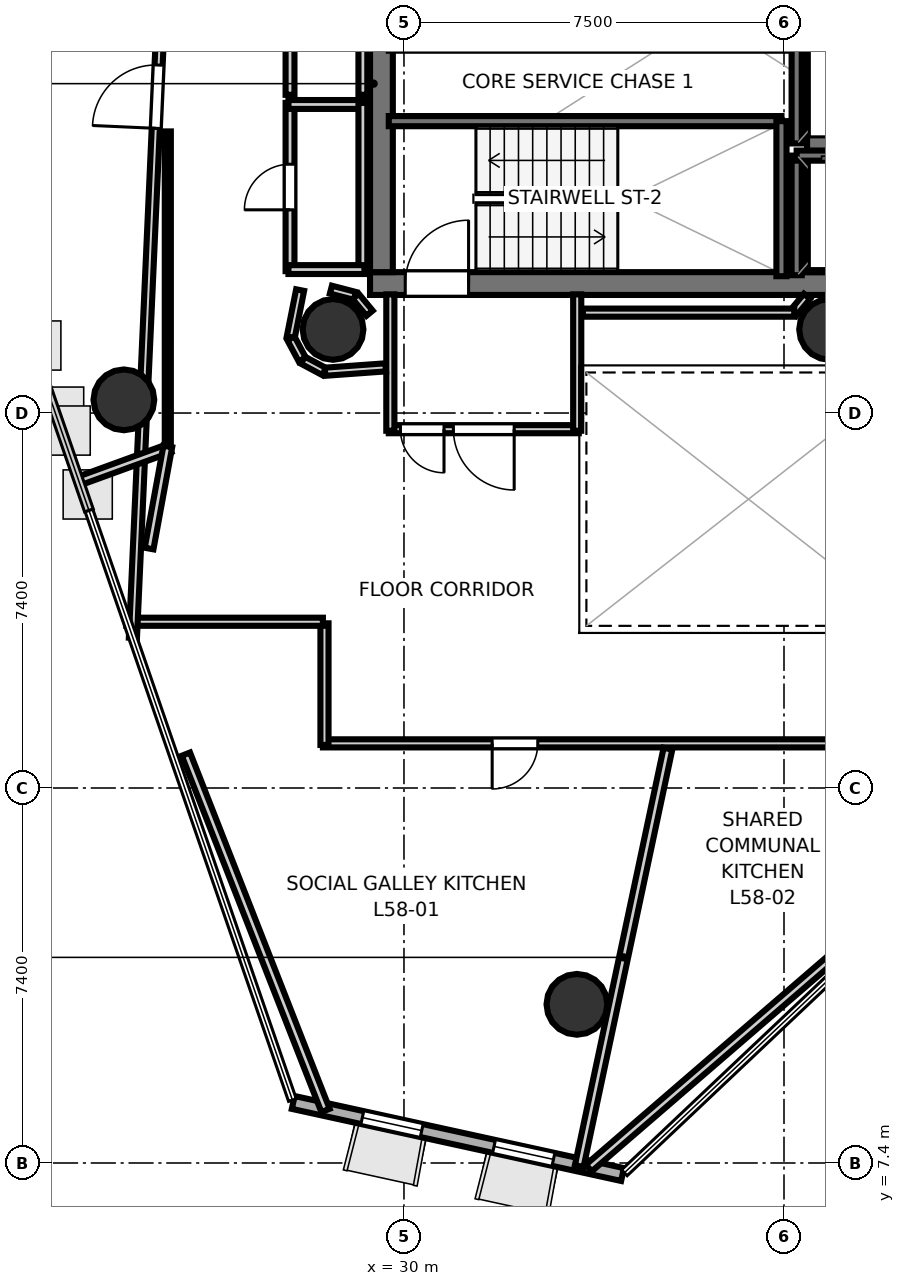
"""IFC4 building model, lengths in metres.
Left out: names, types, materials, properties, quantities, classifications, styles, units other than length and angle.
Written with IfcOpenShell. Run it as: python <this file> out.ifc"""

import sys

from ifc_helpers import new_model, si_unit, direction, frame, frame_2d, origin, origin_2d, place, context, subcontext, project, spatial, rectangle, hollow_circle, extrude, element, fill, save


model = new_model("IFC4")
c1 = context("Model", 3, precision=1e-05, world=origin(), true_north=direction((0.0, 1.0)))
c2 = subcontext(c1, "Body", "Model", "MODEL_VIEW")
j1 = project(units=[si_unit("LENGTHUNIT", "METRE"), si_unit("PLANEANGLEUNIT", "RADIAN")], contexts=[c1])
p1 = place(None, origin())
s1 = spatial("IfcSite", under=j1, at=p1, CompositionType="ELEMENT")
p2 = place(p1, origin())
s2 = spatial("IfcBuilding", under=s1, at=p2, CompositionType="ELEMENT")
p3 = place(p2, frame((0.0, 0.0, 226.2)))
s3 = spatial("IfcBuildingStorey", under=s2, at=p3, CompositionType="ELEMENT", Elevation=226.2)
p4 = place(p3, frame((29.33, 24.755, 0.0), z_axis=(0.0, 0.0, 1.0), x_axis=(1.0, 0.0, 0.0)))
e1 = element("IfcWall", 1, at=p4, inside=s3, PredefinedType="SHEAR", context=c2, shape_type="SweptSolid", body=[
    extrude(rectangle(XDim=10.52, YDim=0.45, at=frame_2d((5.26, 0.0))), origin(), (0.0, 0.0, 1.0), 3.4),
])
p5 = place(p4, frame((0.695, 0.0, 0.0)))
e2 = element("IfcOpeningElement", 2, at=p5, cuts=e1, PredefinedType="OPENING", context=c2, shape_type="SweptSolid", body=[
    extrude(rectangle(XDim=1.25, YDim=2.15, at=frame_2d((0.625, 1.075))), frame((0.0, 0.235, 0.0), z_axis=(0.0, -1.0, 0.0), x_axis=(1.0, 0.0, 0.0)), (0.0, 0.0, 1.0), 0.47),
])
for number, where, z_axis, x_axis in (
    (3, (29.555, 24.98, 0.0), (0.0, 0.0, 1.0), (0.0, 1.0, 0.0)),
    (4, (38.18, 24.98, 0.0), (0.0, 0.0, 1.0), (0.0, 1.0, 0.0)),
):
    element("IfcWall", number, at=place(p3, frame(where, z_axis=z_axis, x_axis=x_axis)), inside=s3, PredefinedType="SHEAR", context=c2, shape_type="SweptSolid", body=[
        extrude(rectangle(XDim=7.44, YDim=0.45, at=frame_2d((3.72, 0.0))), origin(), (0.0, 0.0, 1.0), 3.4),
    ])
for number, where, z_axis, x_axis in (
    (5, (28.6, 23.85, 0.0), (0.0, 0.0, 1.0), (1.0, 0.0, 0.0)),
    (6, (38.4, 23.85, 0.0), (0.0, 0.0, 1.0), (1.0, 0.0, 0.0)),
    (7, (24.472, 22.46, 0.0), (0.0, 0.0, 1.0), (1.0, 0.0, 0.0)),
    (8, (33.413, 10.531, 0.0), (0.0, 0.0, 1.0), (1.0, 0.0, 0.0)),
):
    element("IfcColumn", number, at=place(p3, frame(where, z_axis=z_axis, x_axis=x_axis)), inside=s3, PredefinedType="COLUMN", context=c2, shape_type="SweptSolid", body=[
        extrude(hollow_circle(Radius=0.6, WallThickness=0.03, at=origin_2d()), origin(), (0.0, 0.0, 1.0), 3.7),
    ])
p6 = place(p3, frame((27.814, 8.594, 0.0), z_axis=(0.0, 0.0, 1.0), x_axis=(0.976876309586, -0.213805228583, 0.0)))
e9 = element("IfcWall", 9, at=p6, inside=s3, PredefinedType="SOLIDWALL", context=c2, shape_type="SweptSolid", body=[
    extrude(rectangle(XDim=6.653, YDim=0.26, at=frame_2d((3.326, 0.0))), origin(), (0.0, 0.0, 1.0), 3.4),
])
p7 = place(p6, frame((1.396, 0.0, 0.9)))
e10 = element("IfcOpeningElement", 10, at=p7, cuts=e9, PredefinedType="OPENING", context=c2, shape_type="SweptSolid", body=[
    extrude(rectangle(XDim=1.2, YDim=2.0, at=frame_2d((0.6, 1.0))), frame((0.0, 0.14, 0.0), z_axis=(0.0, -1.0, 0.0), x_axis=(1.0, 0.0, 0.0)), (0.0, 0.0, 1.0), 0.28),
])
p8 = place(p6, frame((4.057, 0.0, 0.9)))
e11 = element("IfcOpeningElement", 11, at=p8, cuts=e9, PredefinedType="OPENING", context=c2, shape_type="SweptSolid", body=[
    extrude(rectangle(XDim=1.2, YDim=2.0, at=frame_2d((0.6, 1.0))), frame((0.0, 0.14, 0.0), z_axis=(0.0, -1.0, 0.0), x_axis=(1.0, 0.0, 0.0)), (0.0, 0.0, 1.0), 0.28),
])
p9 = place(p3, frame((29.7, 27.96, 0.0), z_axis=(0.0, 0.0, 1.0), x_axis=(1.0, 0.0, 0.0)))
e12 = element("IfcWall", 12, at=p9, inside=s3, PredefinedType="SOLIDWALL", context=c2, shape_type="SweptSolid", body=[
    extrude(rectangle(XDim=7.75, YDim=0.2, at=frame_2d((3.875, 0.0))), origin(), (0.0, 0.0, 1.0), 3.4),
])
p10 = place(p3, frame((37.45, 24.9, 0.0), z_axis=(0.0, 0.0, 1.0), x_axis=(0.0, 1.0, 0.0)))
e13 = element("IfcWall", 13, at=p10, inside=s3, PredefinedType="SOLIDWALL", context=c2, shape_type="SweptSolid", body=[
    extrude(rectangle(XDim=3.06, YDim=0.2, at=frame_2d((1.53, 0.0))), origin(), (0.0, 0.0, 1.0), 3.4),
])
p11 = place(p3, frame((37.75, 24.92, 0.0), z_axis=(0.0, 0.0, 1.0), x_axis=(0.0, 1.0, 0.0)))
e14 = element("IfcWall", 14, at=p11, inside=s3, PredefinedType="SOLIDWALL", context=c2, shape_type="SweptSolid", body=[
    extrude(rectangle(XDim=2.36, YDim=0.2, at=frame_2d((1.18, 0.0))), origin(), (0.0, 0.0, 1.0), 3.4),
])
p12 = place(p3, frame((37.75, 27.28, 0.0), z_axis=(0.0, 0.0, 1.0), x_axis=(1.0, 0.0, 0.0)))
e15 = element("IfcWall", 15, at=p12, inside=s3, PredefinedType="SOLIDWALL", context=c2, shape_type="SweptSolid", body=[
    extrude(rectangle(XDim=2.1, YDim=0.2, at=frame_2d((1.05, 0.0))), origin(), (0.0, 0.0, 1.0), 3.4),
])
p13 = place(p3, frame((37.75, 27.52, 0.0), z_axis=(0.0, 0.0, 1.0), x_axis=(0.0, 1.0, 0.0)))
e16 = element("IfcWall", 16, at=p13, inside=s3, PredefinedType="SOLIDWALL", context=c2, shape_type="SweptSolid", body=[
    extrude(rectangle(XDim=2.36, YDim=0.2, at=frame_2d((1.18, 0.0))), origin(), (0.0, 0.0, 1.0), 3.4),
])
p14 = place(p3, frame((33.45, 21.881, 0.0), z_axis=(0.0, 0.0, 1.0), x_axis=(-1.0, 0.0, 0.0)))
e17 = element("IfcWall", 17, at=p14, inside=s3, PredefinedType="PARTITIONING", context=c2, shape_type="SweptSolid", body=[
    extrude(rectangle(XDim=3.75, YDim=0.16, at=frame_2d((1.875, 0.0))), origin(), (0.0, 0.0, 1.0), 2.72),
])
p15 = place(p14, frame((1.275, 0.0, 0.0)))
e18 = element("IfcOpeningElement", 18, at=p15, cuts=e17, PredefinedType="OPENING", context=c2, shape_type="SweptSolid", body=[
    extrude(rectangle(XDim=1.2, YDim=2.15, at=frame_2d((0.6, 1.075))), frame((0.0, 0.09, 0.0), z_axis=(0.0, -1.0, 0.0), x_axis=(1.0, 0.0, 0.0)), (0.0, 0.0, 1.0), 0.18),
])
p16 = place(p14, frame((2.66, 0.0, 0.0)))
e19 = element("IfcOpeningElement", 19, at=p16, cuts=e17, PredefinedType="OPENING", context=c2, shape_type="SweptSolid", body=[
    extrude(rectangle(XDim=0.86, YDim=2.05, at=frame_2d((0.43, 1.025))), frame((0.0, 0.09, 0.0), z_axis=(0.0, -1.0, 0.0), x_axis=(1.0, 0.0, 0.0)), (0.0, 0.0, 1.0), 0.18),
])
for number, where, z_axis, x_axis in (
    (20, (29.731, 21.85, 0.0), (0.0, 0.0, 1.0), (0.0, 1.0, 0.0)),
    (21, (33.419, 24.542, 0.0), (0.0, 0.0, 1.0), (0.0, -1.0, 0.0)),
):
    element("IfcWall", number, at=place(p3, frame(where, z_axis=z_axis, x_axis=x_axis)), inside=s3, PredefinedType="PARTITIONING", context=c2, shape_type="SweptSolid", body=[
        extrude(rectangle(XDim=2.692, YDim=0.16, at=frame_2d((1.346, 0.0))), origin(), (0.0, 0.0, 1.0), 2.72),
    ])
p17 = place(p3, frame((27.751, 25.0, 0.0), z_axis=(0.0, 0.0, 1.0), x_axis=(0.0, 1.0, 0.0)))
e22 = element("IfcWall", 22, at=p17, inside=s3, PredefinedType="PLUMBINGWALL", context=c2, shape_type="SweptSolid", body=[
    extrude(rectangle(XDim=3.32, YDim=0.175, at=frame_2d((1.66, 0.0))), origin(), (0.0, 0.0, 1.0), 2.72),
])
p18 = place(p17, frame((1.21, 0.0, 0.0)))
e23 = element("IfcOpeningElement", 23, at=p18, cuts=e22, PredefinedType="OPENING", context=c2, shape_type="SweptSolid", body=[
    extrude(rectangle(XDim=0.9, YDim=2.1, at=frame_2d((0.45, 1.05))), frame((0.0, 0.097, 0.0), z_axis=(0.0, -1.0, 0.0), x_axis=(1.0, 0.0, 0.0)), (0.0, 0.0, 1.0), 0.195),
])
p19 = place(p3, frame((27.72, 28.289, 0.0), z_axis=(0.0, 0.0, 1.0), x_axis=(1.0, 0.0, 0.0)))
e24 = element("IfcWall", 24, at=p19, inside=s3, PredefinedType="PLUMBINGWALL", context=c2, shape_type="SweptSolid", body=[
    extrude(rectangle(XDim=1.5, YDim=0.175, at=frame_2d((0.75, 0.0))), origin(), (0.0, 0.0, 1.0), 2.72),
])
p20 = place(p3, frame((29.189, 28.32, 0.0), z_axis=(0.0, 0.0, 1.0), x_axis=(0.0, -1.0, 0.0)))
e25 = element("IfcWall", 25, at=p20, inside=s3, PredefinedType="PLUMBINGWALL", context=c2, shape_type="SweptSolid", body=[
    extrude(rectangle(XDim=3.32, YDim=0.175, at=frame_2d((1.66, 0.0))), origin(), (0.0, 0.0, 1.0), 2.72),
])
p21 = place(p3, frame((29.22, 25.031, 0.0), z_axis=(0.0, 0.0, 1.0), x_axis=(-1.0, 0.0, 0.0)))
e26 = element("IfcWall", 26, at=p21, inside=s3, PredefinedType="PLUMBINGWALL", context=c2, shape_type="SweptSolid", body=[
    extrude(rectangle(XDim=1.5, YDim=0.175, at=frame_2d((0.75, 0.0))), origin(), (0.0, 0.0, 1.0), 2.72),
])
p22 = place(p3, frame((27.751, 28.48, 0.0), z_axis=(0.0, 0.0, 1.0), x_axis=(0.0, 1.0, 0.0)))
e27 = element("IfcWall", 27, at=p22, inside=s3, PredefinedType="PLUMBINGWALL", context=c2, shape_type="SweptSolid", body=[
    extrude(rectangle(XDim=3.97, YDim=0.175, at=frame_2d((1.985, 0.0))), origin(), (0.0, 0.0, 1.0), 2.72),
])
p23 = place(p22, frame((1.555, 0.0, 0.0)))
e28 = element("IfcOpeningElement", 28, at=p23, cuts=e27, PredefinedType="OPENING", context=c2, shape_type="SweptSolid", body=[
    extrude(rectangle(XDim=0.86, YDim=2.05, at=frame_2d((0.43, 1.025))), frame((0.0, 0.097, 0.0), z_axis=(0.0, -1.0, 0.0), x_axis=(1.0, 0.0, 0.0)), (0.0, 0.0, 1.0), 0.195),
])
p24 = place(p3, frame((29.189, 32.45, 0.0), z_axis=(0.0, 0.0, 1.0), x_axis=(0.0, -1.0, 0.0)))
e29 = element("IfcWall", 29, at=p24, inside=s3, PredefinedType="PLUMBINGWALL", context=c2, shape_type="SweptSolid", body=[
    extrude(rectangle(XDim=3.97, YDim=0.175, at=frame_2d((1.985, 0.0))), origin(), (0.0, 0.0, 1.0), 2.72),
])
p25 = place(p3, frame((29.321, 24.17, 0.0), z_axis=(0.0, 0.0, 1.0), x_axis=(-0.638008265708, 0.770029514296, 0.0)))
e30 = element("IfcWall", 30, at=p25, inside=s3, PredefinedType="PARTITIONING", context=c2, shape_type="SweptSolid", body=[
    extrude(rectangle(XDim=0.431, YDim=0.16, at=frame_2d((0.215, 0.0))), origin(), (0.0, 0.0, 1.0), 2.72),
])
p26 = place(p3, frame((29.03, 24.512, 0.0), z_axis=(0.0, 0.0, 1.0), x_axis=(-0.967681003213, 0.252177469296, 0.0)))
e31 = element("IfcWall", 31, at=p26, inside=s3, PredefinedType="PARTITIONING", context=c2, shape_type="SweptSolid", body=[
    extrude(rectangle(XDim=0.488, YDim=0.16, at=frame_2d((0.244, 0.0))), origin(), (0.0, 0.0, 1.0), 2.72),
])
p27 = place(p3, frame((37.954, 24.502, 0.0), z_axis=(0.0, 0.0, 1.0), x_axis=(-0.638008265708, -0.770029514296, 0.0)))
e32 = element("IfcWall", 32, at=p27, inside=s3, PredefinedType="PARTITIONING", context=c2, shape_type="SweptSolid", body=[
    extrude(rectangle(XDim=0.431, YDim=0.16, at=frame_2d((0.215, 0.0))), origin(), (0.0, 0.0, 1.0), 2.72),
])
p28 = place(p3, frame((37.703, 24.181, 0.0), z_axis=(0.0, 0.0, 1.0), x_axis=(-1.0, 0.0, 0.0)))
e33 = element("IfcWall", 33, at=p28, inside=s3, PredefinedType="PARTITIONING", context=c2, shape_type="SweptSolid", body=[
    extrude(rectangle(XDim=4.173, YDim=0.16, at=frame_2d((2.086, 0.0))), origin(), (0.0, 0.0, 1.0), 2.72),
])
p29 = place(p3, frame((27.95, 24.626, 0.0), z_axis=(0.0, 0.0, 1.0), x_axis=(-0.195125950178, -0.980778192848, 0.0)))
e34 = element("IfcWall", 34, at=p29, inside=s3, PredefinedType="PARTITIONING", context=c2, shape_type="SweptSolid", body=[
    extrude(rectangle(XDim=0.948, YDim=0.16, at=frame_2d((0.474, 0.0))), origin(), (0.0, 0.0, 1.0), 2.72),
])
for number, where, z_axis, x_axis in (
    (35, (27.768, 23.675, 0.0), (0.0, 0.0, 1.0), (0.472, -0.882, 0.0)),
    (36, (28.006, 23.243, 0.0), (0.0, 0.0, 1.0), (0.882, -0.472, 0.0)),
):
    element("IfcWall", number, at=place(p3, frame(where, z_axis=z_axis, x_axis=x_axis)), inside=s3, PredefinedType="PARTITIONING", context=c2, shape_type="SweptSolid", body=[
        extrude(rectangle(XDim=0.476, YDim=0.16, at=frame_2d((0.238, 0.0))), origin(), (0.0, 0.0, 1.0), 2.72),
    ])
p30 = place(p3, frame((28.442, 23.015, 0.0), z_axis=(0.0, 0.0, 1.0), x_axis=(0.99740683837, 0.07196942943, 0.0)))
e37 = element("IfcWall", 37, at=p30, inside=s3, PredefinedType="PARTITIONING", context=c2, shape_type="SweptSolid", body=[
    extrude(rectangle(XDim=1.201, YDim=0.16, at=frame_2d((0.601, 0.0))), origin(), (0.0, 0.0, 1.0), 2.72),
])
p31 = place(p3, frame((43.333, 15.681, 0.0), z_axis=(0.0, 0.0, 1.0), x_axis=(-1.0, 0.0, 0.0)))
e38 = element("IfcWall", 38, at=p31, inside=s3, PredefinedType="PARTITIONING", context=c2, shape_type="SweptSolid", body=[
    extrude(rectangle(XDim=14.933, YDim=0.16, at=frame_2d((7.467, 0.0))), origin(), (0.0, 0.0, 1.0), 2.72),
])
p32 = place(p31, frame((10.693, 0.0, 0.0)))
e39 = element("IfcOpeningElement", 39, at=p32, cuts=e38, PredefinedType="OPENING", context=c2, shape_type="SweptSolid", body=[
    extrude(rectangle(XDim=0.9, YDim=2.1, at=frame_2d((0.45, 1.05))), frame((0.0, 0.09, 0.0), z_axis=(0.0, -1.0, 0.0), x_axis=(1.0, 0.0, 0.0)), (0.0, 0.0, 1.0), 0.18),
])
p33 = place(p31, frame((4.002, 0.0, 0.0)))
e40 = element("IfcOpeningElement", 40, at=p33, cuts=e38, PredefinedType="OPENING", context=c2, shape_type="SweptSolid", body=[
    extrude(rectangle(XDim=0.9, YDim=2.1, at=frame_2d((0.45, 1.05))), frame((0.0, 0.09, 0.0), z_axis=(0.0, -1.0, 0.0), x_axis=(1.0, 0.0, 0.0)), (0.0, 0.0, 1.0), 0.18),
])
p34 = place(p3, frame((28.431, 15.65, 0.0), z_axis=(0.0, 0.0, 1.0), x_axis=(0.0, 1.0, 0.0)))
e41 = element("IfcWall", 41, at=p34, inside=s3, PredefinedType="PARTITIONING", context=c2, shape_type="SweptSolid", body=[
    extrude(rectangle(XDim=2.4, YDim=0.16, at=frame_2d((1.2, 0.0))), origin(), (0.0, 0.0, 1.0), 2.72),
])
p35 = place(p3, frame((28.4, 18.081, 0.0), z_axis=(0.0, 0.0, 1.0), x_axis=(-1.0, 0.0, 0.0)))
e42 = element("IfcWall", 42, at=p35, inside=s3, PredefinedType="PARTITIONING", context=c2, shape_type="SweptSolid", body=[
    extrude(rectangle(XDim=3.879, YDim=0.16, at=frame_2d((1.939, 0.0))), origin(), (0.0, 0.0, 1.0), 2.72),
])
p36 = place(p3, frame((24.65, 17.763, 0.0), z_axis=(0.0, 0.0, 1.0), x_axis=(0.044837312533, 0.998994301988, 0.0)))
e43 = element("IfcWall", 43, at=p36, inside=s3, PredefinedType="PARTITIONING", context=c2, shape_type="SweptSolid", body=[
    extrude(rectangle(XDim=18.524, YDim=0.16, at=frame_2d((9.262, 0.0))), origin(), (0.0, 0.0, 1.0), 2.72),
])
p37 = place(p36, frame((10.065, 0.0, 0.0)))
e44 = element("IfcOpeningElement", 44, at=p37, cuts=e43, PredefinedType="OPENING", context=c2, shape_type="SweptSolid", body=[
    extrude(rectangle(XDim=1.25, YDim=2.2, at=frame_2d((0.625, 1.1))), frame((0.0, 0.09, 0.0), z_axis=(0.0, -1.0, 0.0), x_axis=(1.0, 0.0, 0.0)), (0.0, 0.0, 1.0), 0.18),
])
p38 = place(p3, frame((23.564, 20.85, 0.0), z_axis=(0.0, 0.0, 1.0), x_axis=(0.939704898586, 0.341986408463, 0.0)))
e45 = element("IfcWall", 45, at=p38, inside=s3, PredefinedType="PLUMBINGWALL", context=c2, shape_type="SweptSolid", body=[
    extrude(rectangle(XDim=1.933, YDim=0.175, at=frame_2d((0.967, 0.0))), origin(), (0.0, 0.0, 1.0), 2.72),
])
p39 = place(p3, frame((25.339, 21.54, 0.0), z_axis=(0.0, 0.0, 1.0), x_axis=(-0.180437406322, -0.983586469203, 0.0)))
e46 = element("IfcWall", 46, at=p39, inside=s3, PredefinedType="PLUMBINGWALL", context=c2, shape_type="SweptSolid", body=[
    extrude(rectangle(XDim=2.049, YDim=0.175, at=frame_2d((1.024, 0.0))), origin(), (0.0, 0.0, 1.0), 2.72),
])
p40 = place(p3, frame((35.21, 15.576, 0.0), z_axis=(0.0, 0.0, 1.0), x_axis=(-0.207915270313, -0.978146839882, 0.0)))
e47 = element("IfcWall", 47, at=p40, inside=s3, PredefinedType="PLUMBINGWALL", context=c2, shape_type="SweptSolid", body=[
    extrude(rectangle(XDim=8.422, YDim=0.175, at=frame_2d((4.211, 0.0))), origin(), (0.0, 0.0, 1.0), 2.72),
])
p41 = place(p3, frame((28.451, 8.438, 0.0), z_axis=(0.0, 0.0, 1.0), x_axis=(-0.36487104793, 0.931058063916, 0.0)))
e48 = element("IfcWall", 48, at=p41, inside=s3, PredefinedType="PLUMBINGWALL", context=c2, shape_type="SweptSolid", body=[
    extrude(rectangle(XDim=7.552, YDim=0.175, at=frame_2d((3.776, 0.0))), origin(), (0.0, 0.0, 1.0), 2.72),
])
p42 = place(p3, frame((38.812, 11.755, 0.0), z_axis=(0.0, 0.0, 1.0), x_axis=(-0.757241437099, -0.653135059494, 0.0)))
e49 = element("IfcWall", 49, at=p42, inside=s3, PredefinedType="PLUMBINGWALL", context=c2, shape_type="SweptSolid", body=[
    extrude(rectangle(XDim=6.82, YDim=0.175, at=frame_2d((3.41, 0.0))), origin(), (0.0, 0.0, 1.0), 2.72),
])
p43 = place(p3, frame((25.339, 27.757, 0.0), z_axis=(0.0, 0.0, 1.0), x_axis=(0.0, -1.0, 0.0)))
e50 = element("IfcWall", 50, at=p43, inside=s3, PredefinedType="PARTITIONING", context=c2, shape_type="SweptSolid", body=[
    extrude(rectangle(XDim=6.127, YDim=0.12, at=frame_2d((3.064, 0.0))), origin(), (0.0, 0.0, 1.0), 2.72),
])
p44 = place(p5, origin())
e51 = element("IfcDoor", 51, at=p44, inside=s3, OperationType="SINGLE_SWING_RIGHT", PredefinedType="DOOR", context=c2, shape_type="SweptSolid", body=[
    extrude(rectangle(XDim=1.25, YDim=2.15, at=frame_2d((0.625, 1.075))), frame((0.0, 0.025, 0.0), z_axis=(0.0, -1.0, 0.0), x_axis=(1.0, 0.0, 0.0)), (0.0, 0.0, 1.0), 0.05),
])
fill(e2, e51)
p45 = place(p15, origin())
e52 = element("IfcDoor", 52, at=p45, inside=s3, OperationType="SINGLE_SWING_LEFT", PredefinedType="DOOR", context=c2, shape_type="SweptSolid", body=[
    extrude(rectangle(XDim=1.2, YDim=2.15, at=frame_2d((0.6, 1.075))), frame((0.0, 0.025, 0.0), z_axis=(0.0, -1.0, 0.0), x_axis=(1.0, 0.0, 0.0)), (0.0, 0.0, 1.0), 0.05),
])
fill(e18, e52)
p46 = place(p18, origin())
e53 = element("IfcDoor", 53, at=p46, inside=s3, OperationType="SINGLE_SWING_LEFT", PredefinedType="DOOR", context=c2, shape_type="SweptSolid", body=[
    extrude(rectangle(XDim=0.9, YDim=2.1, at=frame_2d((0.45, 1.05))), frame((0.0, 0.025, 0.0), z_axis=(0.0, -1.0, 0.0), x_axis=(1.0, 0.0, 0.0)), (0.0, 0.0, 1.0), 0.05),
])
fill(e23, e53)
p47 = place(p16, origin())
e54 = element("IfcDoor", 54, at=p47, inside=s3, OperationType="SINGLE_SWING_LEFT", PredefinedType="DOOR", context=c2, shape_type="SweptSolid", body=[
    extrude(rectangle(XDim=0.86, YDim=2.05, at=frame_2d((0.43, 1.025))), frame((0.0, 0.025, 0.0), z_axis=(0.0, -1.0, 0.0), x_axis=(1.0, 0.0, 0.0)), (0.0, 0.0, 1.0), 0.05),
])
fill(e19, e54)
p48 = place(p32, origin())
e55 = element("IfcDoor", 55, at=p48, inside=s3, OperationType="SINGLE_SWING_RIGHT", PredefinedType="DOOR", context=c2, shape_type="SweptSolid", body=[
    extrude(rectangle(XDim=0.9, YDim=2.1, at=frame_2d((0.45, 1.05))), frame((0.0, 0.025, 0.0), z_axis=(0.0, -1.0, 0.0), x_axis=(1.0, 0.0, 0.0)), (0.0, 0.0, 1.0), 0.05),
])
fill(e39, e55)
p49 = place(p37, origin())
e56 = element("IfcDoor", 56, at=p49, inside=s3, OperationType="SINGLE_SWING_LEFT", PredefinedType="DOOR", context=c2, shape_type="SweptSolid", body=[
    extrude(rectangle(XDim=1.25, YDim=2.2, at=frame_2d((0.625, 1.1))), frame((0.0, 0.025, 0.0), z_axis=(0.0, -1.0, 0.0), x_axis=(1.0, 0.0, 0.0)), (0.0, 0.0, 1.0), 0.05),
])
fill(e44, e56)
p50 = place(p7, origin())
e57 = element("IfcWindow", 57, at=p50, inside=s3, PartitioningType="SINGLE_PANEL", PredefinedType="WINDOW", context=c2, shape_type="SweptSolid", body=[
    extrude(rectangle(XDim=1.2, YDim=2.0, at=frame_2d((0.6, 1.0))), frame((0.0, 0.03, 0.0), z_axis=(0.0, -1.0, 0.0), x_axis=(1.0, 0.0, 0.0)), (0.0, 0.0, 1.0), 0.06),
])
fill(e10, e57)
p51 = place(p8, origin())
e58 = element("IfcWindow", 58, at=p51, inside=s3, PartitioningType="SINGLE_PANEL", PredefinedType="WINDOW", context=c2, shape_type="SweptSolid", body=[
    extrude(rectangle(XDim=1.2, YDim=2.0, at=frame_2d((0.6, 1.0))), frame((0.0, 0.03, 0.0), z_axis=(0.0, -1.0, 0.0), x_axis=(1.0, 0.0, 0.0)), (0.0, 0.0, 1.0), 0.06),
])
fill(e11, e58)
save(model, sys.argv[1])
